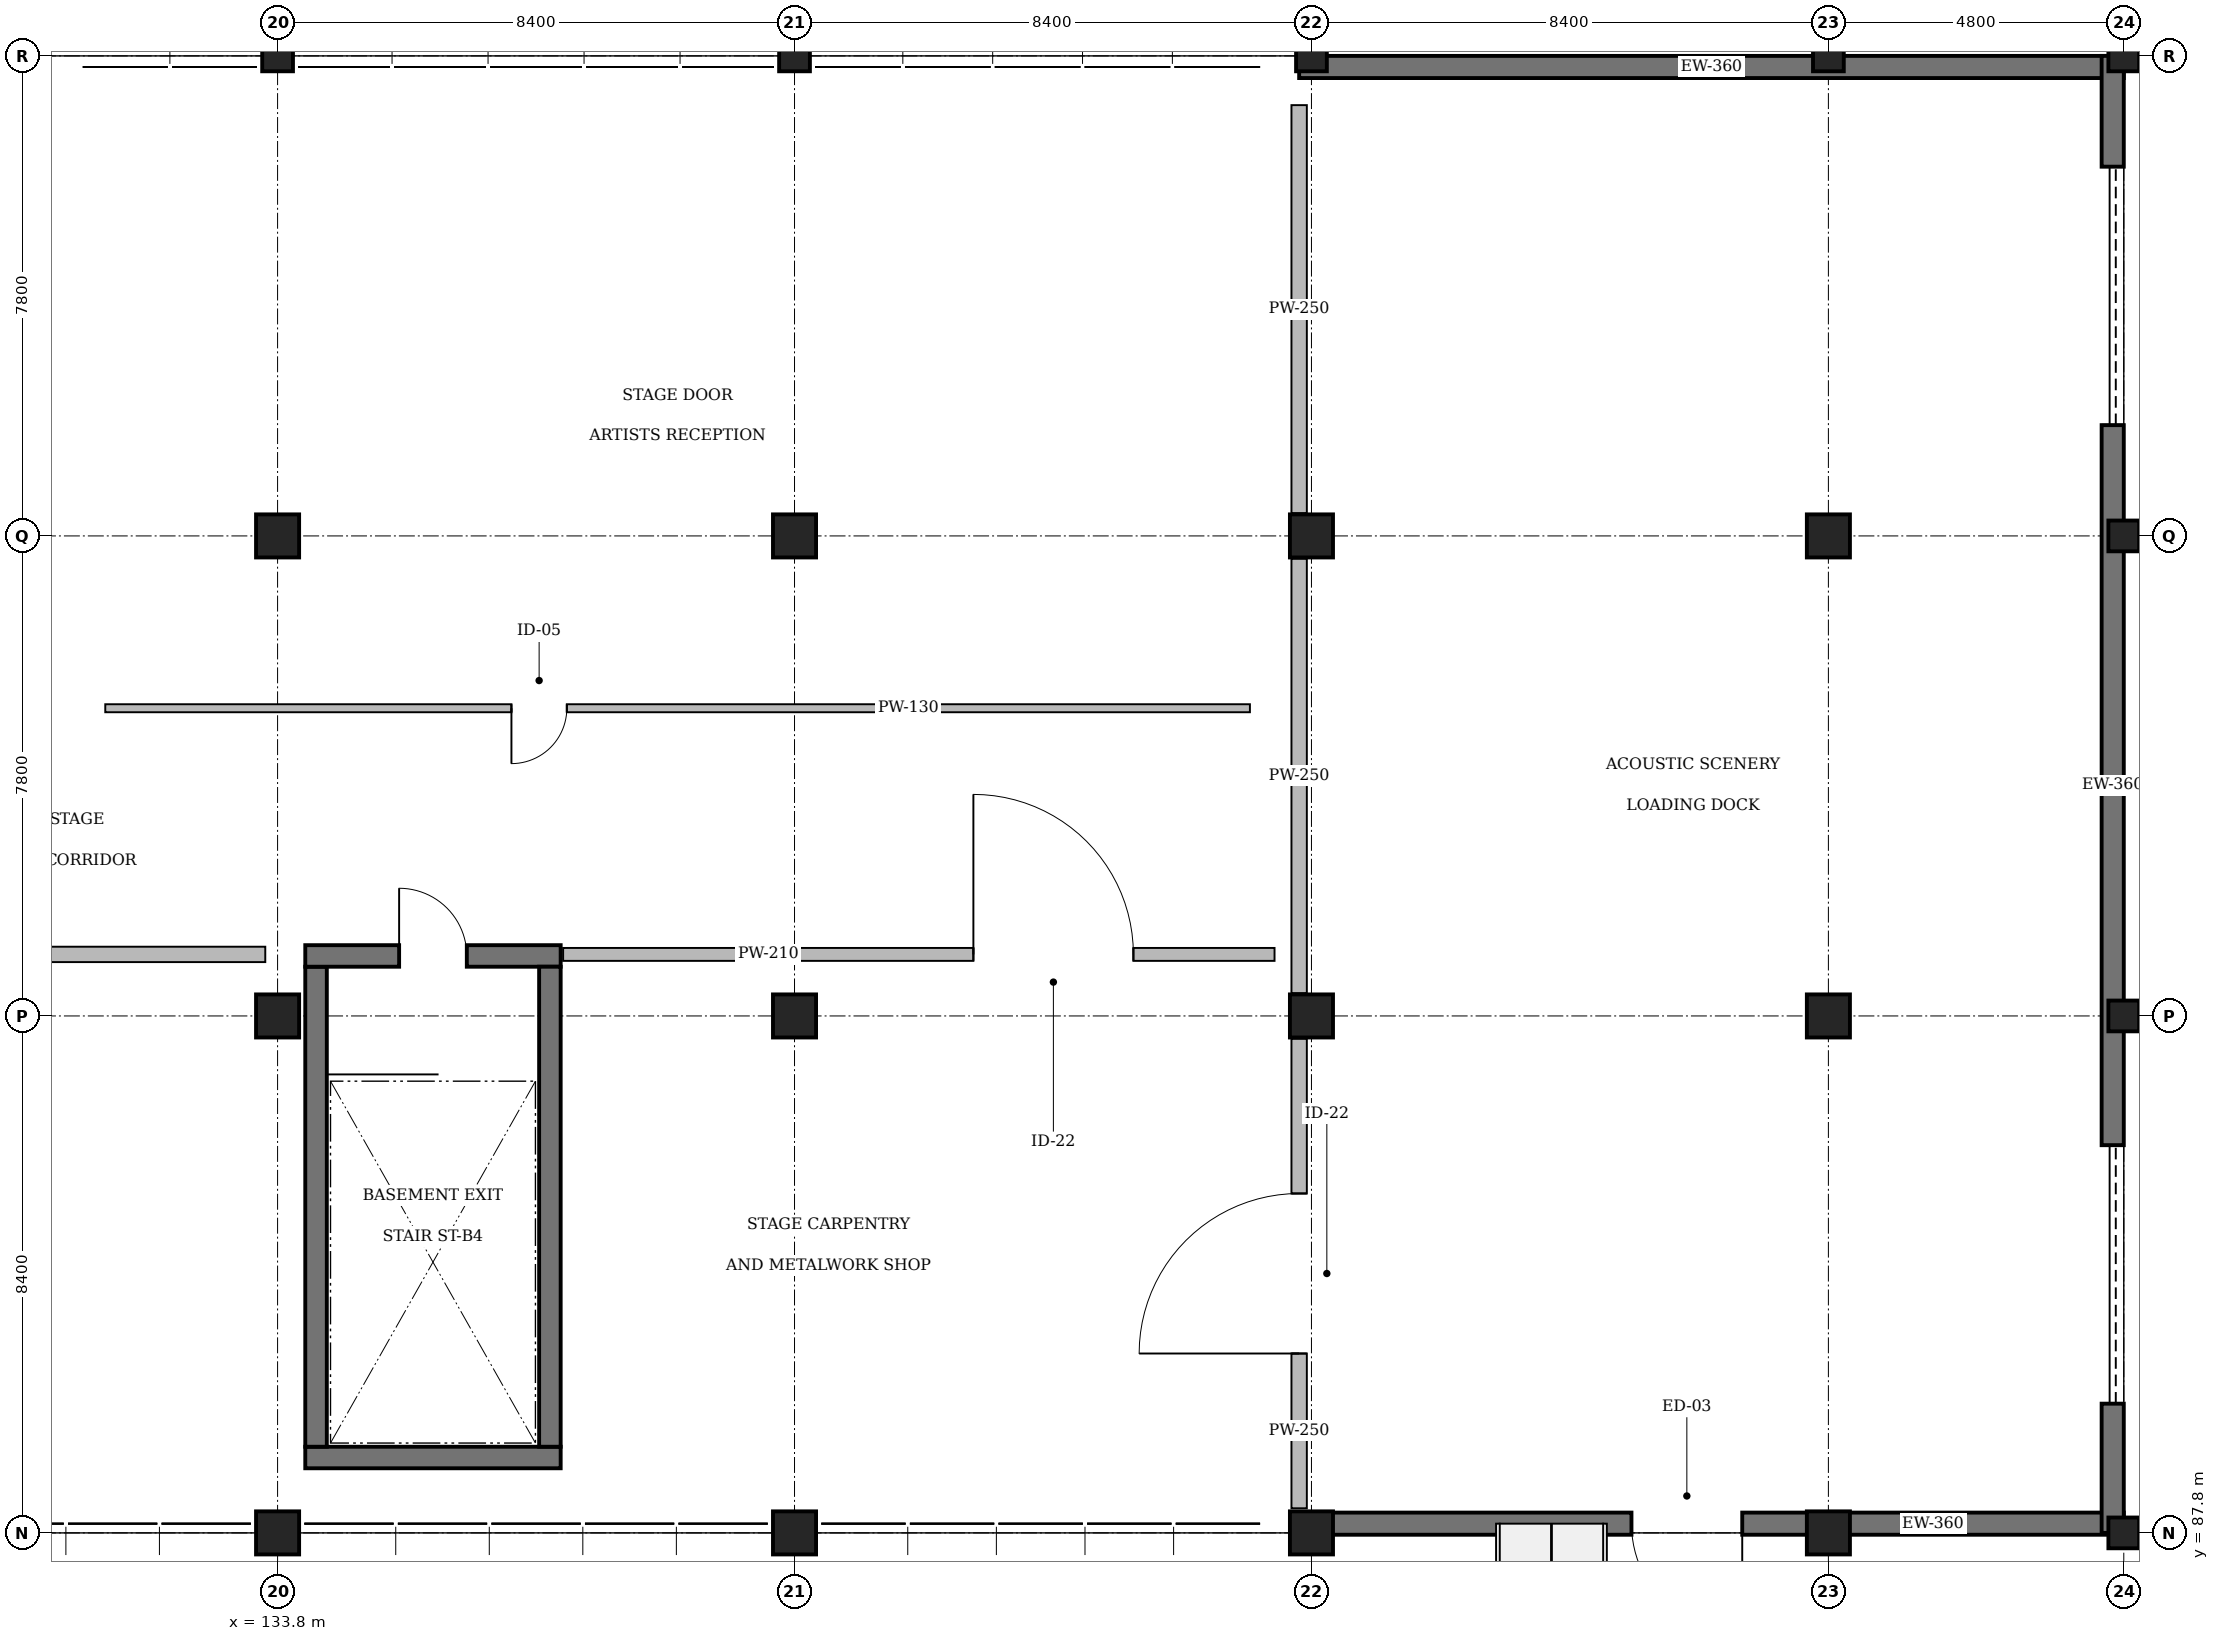
"""IFC4 building model, lengths in metres.
Left out: names, types, materials, properties, quantities, classifications, styles, units other than length and angle.
Written with IfcOpenShell. Run it as: python <this file> out.ifc"""

import sys

from ifc_helpers import new_model, si_unit, direction, frame, frame_2d, origin, origin_2d, place, context, subcontext, project, spatial, rectangle, extrude, element, fill, save


model = new_model("IFC4")
c1 = context("Model", 3, precision=1e-05, world=origin(), true_north=direction((0.0, 1.0)))
c2 = subcontext(c1, "Body", "Model", "MODEL_VIEW")
j1 = project(units=[si_unit("LENGTHUNIT", "METRE"), si_unit("PLANEANGLEUNIT", "RADIAN")], contexts=[c1])
p1 = place(None, origin())
s1 = spatial("IfcSite", under=j1, at=p1, CompositionType="ELEMENT")
p2 = place(p1, origin())
s2 = spatial("IfcBuilding", under=s1, at=p2, CompositionType="ELEMENT")
p3 = place(p2, origin())
s3 = spatial("IfcBuildingStorey", under=s2, at=p3, CompositionType="ELEMENT", Elevation=0.0)
for number, where, z_axis, x_axis in (
    (1, (133.8, 87.8, 0.0), (0.0, 0.0, 1.0), (1.0, 0.0, 0.0)),
    (2, (133.8, 96.2, 0.0), (0.0, 0.0, 1.0), (1.0, 0.0, 0.0)),
    (3, (133.8, 104.0, 0.0), (0.0, 0.0, 1.0), (1.0, 0.0, 0.0)),
):
    element("IfcColumn", number, at=place(p3, frame(where, z_axis=z_axis, x_axis=x_axis)), inside=s3, PredefinedType="COLUMN", context=c2, shape_type="SweptSolid", body=[
        extrude(rectangle(XDim=0.7, YDim=0.7, at=origin_2d()), origin(), (0.0, 0.0, 1.0), 4.8),
    ])
p4 = place(p3, frame((133.8, 111.8, 0.0), z_axis=(0.0, 0.0, 1.0), x_axis=(1.0, 0.0, 0.0)))
e4 = element("IfcColumn", 4, at=p4, inside=s3, PredefinedType="COLUMN", context=c2, shape_type="SweptSolid", body=[
    extrude(rectangle(XDim=0.5, YDim=0.5, at=origin_2d()), origin(), (0.0, 0.0, 1.0), 4.8),
])
for number, where, z_axis, x_axis in (
    (5, (142.2, 87.8, 0.0), (0.0, 0.0, 1.0), (1.0, 0.0, 0.0)),
    (6, (142.2, 96.2, 0.0), (0.0, 0.0, 1.0), (1.0, 0.0, 0.0)),
    (7, (142.2, 104.0, 0.0), (0.0, 0.0, 1.0), (1.0, 0.0, 0.0)),
):
    element("IfcColumn", number, at=place(p3, frame(where, z_axis=z_axis, x_axis=x_axis)), inside=s3, PredefinedType="COLUMN", context=c2, shape_type="SweptSolid", body=[
        extrude(rectangle(XDim=0.7, YDim=0.7, at=origin_2d()), origin(), (0.0, 0.0, 1.0), 4.8),
    ])
p5 = place(p3, frame((142.2, 111.8, 0.0), z_axis=(0.0, 0.0, 1.0), x_axis=(1.0, 0.0, 0.0)))
e8 = element("IfcColumn", 8, at=p5, inside=s3, PredefinedType="COLUMN", context=c2, shape_type="SweptSolid", body=[
    extrude(rectangle(XDim=0.5, YDim=0.5, at=origin_2d()), origin(), (0.0, 0.0, 1.0), 4.8),
])
for number, where, z_axis, x_axis in (
    (9, (150.6, 87.8, 0.0), (0.0, 0.0, 1.0), (1.0, 0.0, 0.0)),
    (10, (150.6, 96.2, 0.0), (0.0, 0.0, 1.0), (1.0, 0.0, 0.0)),
    (11, (150.6, 104.0, 0.0), (0.0, 0.0, 1.0), (1.0, 0.0, 0.0)),
):
    element("IfcColumn", number, at=place(p3, frame(where, z_axis=z_axis, x_axis=x_axis)), inside=s3, PredefinedType="COLUMN", context=c2, shape_type="SweptSolid", body=[
        extrude(rectangle(XDim=0.7, YDim=0.7, at=origin_2d()), origin(), (0.0, 0.0, 1.0), 4.8),
    ])
p6 = place(p3, frame((150.6, 111.8, 0.0), z_axis=(0.0, 0.0, 1.0), x_axis=(1.0, 0.0, 0.0)))
e12 = element("IfcColumn", 12, at=p6, inside=s3, PredefinedType="COLUMN", context=c2, shape_type="SweptSolid", body=[
    extrude(rectangle(XDim=0.5, YDim=0.5, at=origin_2d()), origin(), (0.0, 0.0, 1.0), 4.8),
])
for number, where, z_axis, x_axis in (
    (13, (159.0, 87.8, 0.0), (0.0, 0.0, 1.0), (1.0, 0.0, 0.0)),
    (14, (159.0, 96.2, 0.0), (0.0, 0.0, 1.0), (1.0, 0.0, 0.0)),
    (15, (159.0, 104.0, 0.0), (0.0, 0.0, 1.0), (1.0, 0.0, 0.0)),
):
    element("IfcColumn", number, at=place(p3, frame(where, z_axis=z_axis, x_axis=x_axis)), inside=s3, PredefinedType="COLUMN", context=c2, shape_type="SweptSolid", body=[
        extrude(rectangle(XDim=0.7, YDim=0.7, at=origin_2d()), origin(), (0.0, 0.0, 1.0), 4.66),
    ])
for number, where, z_axis, x_axis in (
    (16, (159.0, 111.8, 0.0), (0.0, 0.0, 1.0), (1.0, 0.0, 0.0)),
    (17, (163.8, 87.8, 0.0), (0.0, 0.0, 1.0), (1.0, 0.0, 0.0)),
    (18, (163.8, 96.2, 0.0), (0.0, 0.0, 1.0), (1.0, 0.0, 0.0)),
    (19, (163.8, 104.0, 0.0), (0.0, 0.0, 1.0), (1.0, 0.0, 0.0)),
    (20, (163.8, 111.8, 0.0), (0.0, 0.0, 1.0), (1.0, 0.0, 0.0)),
):
    element("IfcColumn", number, at=place(p3, frame(where, z_axis=z_axis, x_axis=x_axis)), inside=s3, PredefinedType="COLUMN", context=c2, shape_type="SweptSolid", body=[
        extrude(rectangle(XDim=0.5, YDim=0.5, at=origin_2d()), origin(), (0.0, 0.0, 1.0), 4.66),
    ])
p7 = place(p3, frame((138.4, 89.025, 0.0), z_axis=(0.0, 0.0, 1.0), x_axis=(-1.0, 0.0, 0.0)))
e21 = element("IfcWall", 21, at=p7, inside=s3, PredefinedType="SOLIDWALL", context=c2, shape_type="SweptSolid", body=[
    extrude(rectangle(XDim=4.15, YDim=0.35, at=frame_2d((2.075, 0.0))), origin(), (0.0, 0.0, 1.0), 4.56),
])
p8 = place(p3, frame((134.425, 89.2, 0.0), z_axis=(0.0, 0.0, 1.0), x_axis=(0.0, 1.0, 0.0)))
e22 = element("IfcWall", 22, at=p8, inside=s3, PredefinedType="SOLIDWALL", context=c2, shape_type="SweptSolid", body=[
    extrude(rectangle(XDim=7.8, YDim=0.35, at=frame_2d((3.9, 0.0))), origin(), (0.0, 0.0, 1.0), 4.56),
])
p9 = place(p3, frame((134.25, 97.175, 0.0), z_axis=(0.0, 0.0, 1.0), x_axis=(1.0, 0.0, 0.0)))
e23 = element("IfcWall", 23, at=p9, inside=s3, PredefinedType="SOLIDWALL", context=c2, shape_type="SweptSolid", body=[
    extrude(rectangle(XDim=4.15, YDim=0.35, at=frame_2d((2.075, 0.0))), origin(), (0.0, 0.0, 1.0), 4.56),
])
p10 = place(p9, frame((1.525, 0.0, 0.0)))
e24 = element("IfcOpeningElement", 24, at=p10, cuts=e23, PredefinedType="OPENING", context=c2, shape_type="SweptSolid", body=[
    extrude(rectangle(XDim=1.1, YDim=2.15, at=frame_2d((0.55, 1.075))), frame((0.0, 0.195, 0.0), z_axis=(0.0, -1.0, 0.0), x_axis=(1.0, 0.0, 0.0)), (0.0, 0.0, 1.0), 0.39),
])
p11 = place(p3, frame((138.225, 97.0, 0.0), z_axis=(0.0, 0.0, 1.0), x_axis=(0.0, -1.0, 0.0)))
e25 = element("IfcWall", 25, at=p11, inside=s3, PredefinedType="SOLIDWALL", context=c2, shape_type="SweptSolid", body=[
    extrude(rectangle(XDim=7.8, YDim=0.35, at=frame_2d((3.9, 0.0))), origin(), (0.0, 0.0, 1.0), 4.56),
])
p12 = place(p3, frame((150.4, 111.62, 0.0), z_axis=(0.0, 0.0, 1.0), x_axis=(1.0, 0.0, 0.0)))
e26 = element("IfcWall", 26, at=p12, inside=s3, PredefinedType="SOLIDWALL", context=c2, shape_type="SweptSolid", body=[
    extrude(rectangle(XDim=13.4, YDim=0.36, at=frame_2d((6.7, 0.0))), origin(), (0.0, 0.0, 1.0), 4.8),
])
p13 = place(p3, frame((163.8, 87.95, 0.0), z_axis=(0.0, 0.0, 1.0), x_axis=(-1.0, 0.0, 0.0)))
e27 = element("IfcWall", 27, at=p13, inside=s3, PredefinedType="SOLIDWALL", context=c2, shape_type="SweptSolid", body=[
    extrude(rectangle(XDim=13.4, YDim=0.36, at=frame_2d((6.7, 0.0))), origin(), (0.0, 0.0, 1.0), 4.8),
])
p14 = place(p13, frame((6.2, 0.0, 0.0)))
e28 = element("IfcOpeningElement", 28, at=p14, cuts=e27, PredefinedType="OPENING", context=c2, shape_type="SweptSolid", body=[
    extrude(rectangle(XDim=1.8, YDim=2.2, at=frame_2d((0.9, 1.1))), frame((0.0, 0.2, 0.0), z_axis=(0.0, -1.0, 0.0), x_axis=(1.0, 0.0, 0.0)), (0.0, 0.0, 1.0), 0.4),
])
p15 = place(p3, frame((163.62, 87.8, 0.0), z_axis=(0.0, 0.0, 1.0), x_axis=(0.0, 1.0, 0.0)))
e29 = element("IfcWall", 29, at=p15, inside=s3, PredefinedType="SOLIDWALL", context=c2, shape_type="SweptSolid", body=[
    extrude(rectangle(XDim=24.0, YDim=0.36, at=frame_2d((12.0, 0.0))), origin(), (0.0, 0.0, 1.0), 4.8),
])
p16 = place(p15, frame((2.1, 0.0, 0.0)))
e30 = element("IfcOpeningElement", 30, at=p16, cuts=e29, PredefinedType="OPENING", context=c2, shape_type="SweptSolid", body=[
    extrude(rectangle(XDim=4.2, YDim=3.8, at=frame_2d((2.1, 1.9))), frame((0.0, 0.2, 0.0), z_axis=(0.0, -1.0, 0.0), x_axis=(1.0, 0.0, 0.0)), (0.0, 0.0, 1.0), 0.4),
])
p17 = place(p15, frame((18.0, 0.0, 0.0)))
e31 = element("IfcOpeningElement", 31, at=p17, cuts=e29, PredefinedType="OPENING", context=c2, shape_type="SweptSolid", body=[
    extrude(rectangle(XDim=4.2, YDim=3.8, at=frame_2d((2.1, 1.9))), frame((0.0, 0.2, 0.0), z_axis=(0.0, -1.0, 0.0), x_axis=(1.0, 0.0, 0.0)), (0.0, 0.0, 1.0), 0.4),
])
p18 = place(p3, frame((115.2, 97.2, 0.0), z_axis=(0.0, 0.0, 1.0), x_axis=(1.0, 0.0, 0.0)))
e32 = element("IfcWall", 32, at=p18, inside=s3, PredefinedType="PARTITIONING", context=c2, shape_type="SweptSolid", body=[
    extrude(rectangle(XDim=18.4, YDim=0.25, at=frame_2d((9.2, 0.0))), origin(), (0.0, 0.0, 1.0), 4.54),
])
p19 = place(p18, frame((4.806, 0.0, 0.0)))
e33 = element("IfcOpeningElement", 33, at=p19, cuts=e32, PredefinedType="OPENING", context=c2, shape_type="SweptSolid", body=[
    extrude(rectangle(XDim=2.6, YDim=3.2, at=frame_2d((1.3, 1.6))), frame((0.0, 0.145, 0.0), z_axis=(0.0, -1.0, 0.0), x_axis=(1.0, 0.0, 0.0)), (0.0, 0.0, 1.0), 0.29),
])
p20 = place(p3, frame((150.4, 88.2, 0.0), z_axis=(0.0, 0.0, 1.0), x_axis=(0.0, 1.0, 0.0)))
e34 = element("IfcWall", 34, at=p20, inside=s3, PredefinedType="PARTITIONING", context=c2, shape_type="SweptSolid", body=[
    extrude(rectangle(XDim=7.63, YDim=0.25, at=frame_2d((3.815, 0.0))), origin(), (0.0, 0.0, 1.0), 3.66),
])
p21 = place(p20, frame((2.515, 0.0, 0.0)))
e35 = element("IfcOpeningElement", 35, at=p21, cuts=e34, PredefinedType="OPENING", context=c2, shape_type="SweptSolid", body=[
    extrude(rectangle(XDim=2.6, YDim=3.2, at=frame_2d((1.3, 1.6))), frame((0.0, 0.145, 0.0), z_axis=(0.0, -1.0, 0.0), x_axis=(1.0, 0.0, 0.0)), (0.0, 0.0, 1.0), 0.29),
])
p22 = place(p3, frame((150.4, 96.57, 0.0), z_axis=(0.0, 0.0, 1.0), x_axis=(0.0, 1.0, 0.0)))
e36 = element("IfcWall", 36, at=p22, inside=s3, PredefinedType="PARTITIONING", context=c2, shape_type="SweptSolid", body=[
    extrude(rectangle(XDim=7.06, YDim=0.25, at=frame_2d((3.53, 0.0))), origin(), (0.0, 0.0, 1.0), 3.86),
])
p23 = place(p3, frame((150.4, 104.37, 0.0), z_axis=(0.0, 0.0, 1.0), x_axis=(0.0, 1.0, 0.0)))
e37 = element("IfcWall", 37, at=p23, inside=s3, PredefinedType="PARTITIONING", context=c2, shape_type="SweptSolid", body=[
    extrude(rectangle(XDim=6.63, YDim=0.25, at=frame_2d((3.315, 0.0))), origin(), (0.0, 0.0, 1.0), 3.86),
])
p24 = place(p3, frame((149.6, 101.2, 0.0), z_axis=(0.0, 0.0, 1.0), x_axis=(-1.0, 0.0, 0.0)))
e38 = element("IfcWall", 38, at=p24, inside=s3, PredefinedType="PARTITIONING", context=c2, shape_type="SweptSolid", body=[
    extrude(rectangle(XDim=18.6, YDim=0.13, at=frame_2d((9.3, 0.0))), origin(), (0.0, 0.0, 1.0), 4.54),
])
p25 = place(p24, frame((11.1, 0.0, 0.0)))
e39 = element("IfcOpeningElement", 39, at=p25, cuts=e38, PredefinedType="OPENING", context=c2, shape_type="SweptSolid", body=[
    extrude(rectangle(XDim=0.9, YDim=2.15, at=frame_2d((0.45, 1.075))), frame((0.0, 0.085, 0.0), z_axis=(0.0, -1.0, 0.0), x_axis=(1.0, 0.0, 0.0)), (0.0, 0.0, 1.0), 0.17),
])
p26 = place(p3, frame((138.44, 97.2, 0.0), z_axis=(0.0, 0.0, 1.0), x_axis=(1.0, 0.0, 0.0)))
e40 = element("IfcWall", 40, at=p26, inside=s3, PredefinedType="PARTITIONING", context=c2, shape_type="SweptSolid", body=[
    extrude(rectangle(XDim=11.56, YDim=0.21, at=frame_2d((5.78, 0.0))), origin(), (0.0, 0.0, 1.0), 4.56),
])
p27 = place(p26, frame((6.667, 0.0, 0.0)))
e41 = element("IfcOpeningElement", 41, at=p27, cuts=e40, PredefinedType="OPENING", context=c2, shape_type="SweptSolid", body=[
    extrude(rectangle(XDim=2.6, YDim=3.2, at=frame_2d((1.3, 1.6))), frame((0.0, 0.125, 0.0), z_axis=(0.0, -1.0, 0.0), x_axis=(1.0, 0.0, 0.0)), (0.0, 0.0, 1.0), 0.25),
])
p28 = place(p10, origin())
e42 = element("IfcDoor", 42, at=p28, inside=s3, OperationType="SINGLE_SWING_LEFT", PredefinedType="DOOR", context=c2, shape_type="SweptSolid", body=[
    extrude(rectangle(XDim=1.1, YDim=2.15, at=frame_2d((0.55, 1.075))), frame((0.0, 0.025, 0.0), z_axis=(0.0, -1.0, 0.0), x_axis=(1.0, 0.0, 0.0)), (0.0, 0.0, 1.0), 0.05),
])
fill(e24, e42)
p29 = place(p14, origin())
e43 = element("IfcDoor", 43, at=p29, inside=s3, OperationType="SINGLE_SWING_LEFT", PredefinedType="DOOR", context=c2, shape_type="SweptSolid", body=[
    extrude(rectangle(XDim=1.8, YDim=2.2, at=frame_2d((0.9, 1.1))), frame((0.0, 0.025, 0.0), z_axis=(0.0, -1.0, 0.0), x_axis=(1.0, 0.0, 0.0)), (0.0, 0.0, 1.0), 0.05),
])
fill(e28, e43)
p30 = place(p16, origin())
e44 = element("IfcDoor", 44, at=p30, inside=s3, OperationType="SINGLE_SWING_LEFT", PredefinedType="GATE", context=c2, shape_type="SweptSolid", body=[
    extrude(rectangle(XDim=4.2, YDim=3.8, at=frame_2d((2.1, 1.9))), frame((0.0, 0.025, 0.0), z_axis=(0.0, -1.0, 0.0), x_axis=(1.0, 0.0, 0.0)), (0.0, 0.0, 1.0), 0.05),
])
fill(e30, e44)
p31 = place(p17, origin())
e45 = element("IfcDoor", 45, at=p31, inside=s3, OperationType="SINGLE_SWING_LEFT", PredefinedType="GATE", context=c2, shape_type="SweptSolid", body=[
    extrude(rectangle(XDim=4.2, YDim=3.8, at=frame_2d((2.1, 1.9))), frame((0.0, 0.025, 0.0), z_axis=(0.0, -1.0, 0.0), x_axis=(1.0, 0.0, 0.0)), (0.0, 0.0, 1.0), 0.05),
])
fill(e31, e45)
p32 = place(p21, origin())
e46 = element("IfcDoor", 46, at=p32, inside=s3, OperationType="DOUBLE_DOOR_SINGLE_SWING", PredefinedType="DOOR", context=c2, shape_type="SweptSolid", body=[
    extrude(rectangle(XDim=2.6, YDim=3.2, at=frame_2d((1.3, 1.6))), frame((0.0, 0.025, 0.0), z_axis=(0.0, -1.0, 0.0), x_axis=(1.0, 0.0, 0.0)), (0.0, 0.0, 1.0), 0.05),
])
fill(e35, e46)
p33 = place(p25, origin())
e47 = element("IfcDoor", 47, at=p33, inside=s3, OperationType="SINGLE_SWING_RIGHT", PredefinedType="DOOR", context=c2, shape_type="SweptSolid", body=[
    extrude(rectangle(XDim=0.9, YDim=2.15, at=frame_2d((0.45, 1.075))), frame((0.0, 0.025, 0.0), z_axis=(0.0, -1.0, 0.0), x_axis=(1.0, 0.0, 0.0)), (0.0, 0.0, 1.0), 0.05),
])
fill(e39, e47)
p34 = place(p27, origin())
e48 = element("IfcDoor", 48, at=p34, inside=s3, OperationType="DOUBLE_DOOR_SINGLE_SWING", PredefinedType="DOOR", context=c2, shape_type="SweptSolid", body=[
    extrude(rectangle(XDim=2.6, YDim=3.2, at=frame_2d((1.3, 1.6))), frame((0.0, 0.025, 0.0), z_axis=(0.0, -1.0, 0.0), x_axis=(1.0, 0.0, 0.0)), (0.0, 0.0, 1.0), 0.05),
])
fill(e41, e48)
save(model, sys.argv[1])
